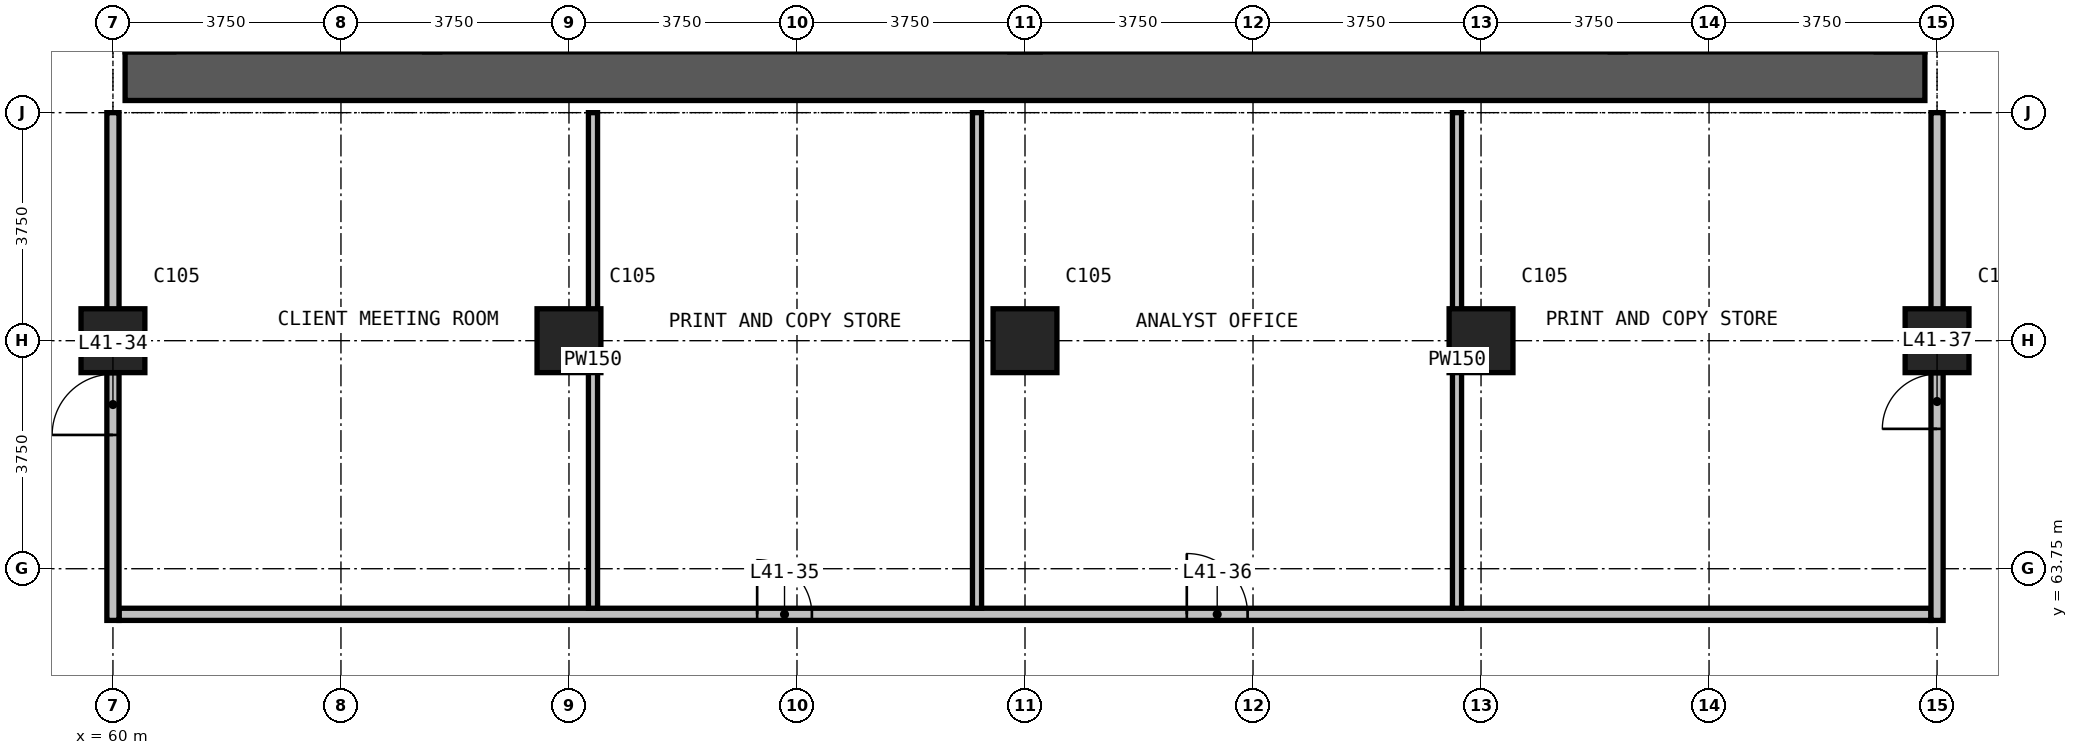
"""IFC4 building model, lengths in metres.
Left out: names, types, materials, properties, quantities, classifications, styles, units other than length and angle.
Written with IfcOpenShell. Run it as: python <this file> out.ifc"""

import sys

from ifc_helpers import new_model, si_unit, direction, frame, frame_2d, origin, origin_2d, place, context, subcontext, project, spatial, rectangle, extrude, element, fill, save


model = new_model("IFC4")
c1 = context("Model", 3, precision=1e-05, world=origin(), true_north=direction((0.0, 1.0)))
c2 = subcontext(c1, "Body", "Model", "MODEL_VIEW")
j1 = project(units=[si_unit("LENGTHUNIT", "METRE"), si_unit("PLANEANGLEUNIT", "RADIAN")], contexts=[c1])
p1 = place(None, origin())
s1 = spatial("IfcSite", under=j1, at=p1, CompositionType="ELEMENT")
p2 = place(p1, origin())
s2 = spatial("IfcBuilding", under=s1, at=p2, CompositionType="ELEMENT")
p3 = place(p2, frame((0.0, 0.0, 162.1)))
s3 = spatial("IfcBuildingStorey", under=s2, at=p3, CompositionType="ELEMENT", Elevation=162.1)
for number, where, z_axis, x_axis in (
    (1, (60.0, 67.5, 0.0), (0.0, 0.0, 1.0), (1.0, 0.0, 0.0)),
    (2, (67.5, 67.5, 0.0), (0.0, 0.0, 1.0), (1.0, 0.0, 0.0)),
    (3, (75.0, 67.5, 0.0), (0.0, 0.0, 1.0), (1.0, 0.0, 0.0)),
    (4, (82.5, 67.5, 0.0), (0.0, 0.0, 1.0), (1.0, 0.0, 0.0)),
    (5, (90.0, 67.5, 0.0), (0.0, 0.0, 1.0), (1.0, 0.0, 0.0)),
):
    element("IfcColumn", number, at=place(p3, frame(where, z_axis=z_axis, x_axis=x_axis)), inside=s3, PredefinedType="COLUMN", context=c2, shape_type="SweptSolid", body=[
        extrude(rectangle(XDim=1.05, YDim=1.05, at=origin_2d()), origin(), (0.0, 0.0, 1.0), 3.6),
    ])
p4 = place(p3, frame((60.2, 71.85, 0.0), z_axis=(0.0, 0.0, 1.0), x_axis=(1.0, 0.0, 0.0)))
e6 = element("IfcWall", 6, at=p4, inside=s3, PredefinedType="SHEAR", context=c2, shape_type="SweptSolid", body=[
    extrude(rectangle(XDim=29.6, YDim=0.8, at=frame_2d((14.8, 0.0))), origin(), (0.0, 0.0, 1.0), 3.6),
])
p5 = place(p3, frame((60.1, 63.0, 0.0), z_axis=(0.0, 0.0, 1.0), x_axis=(1.0, 0.0, 0.0)))
e7 = element("IfcWall", 7, at=p5, inside=s3, PredefinedType="PARTITIONING", context=c2, shape_type="SweptSolid", body=[
    extrude(rectangle(XDim=29.8, YDim=0.2, at=frame_2d((14.9, 0.0))), origin(), (0.0, 0.0, 1.0), 3.3),
])
p6 = place(p5, frame((10.495, 0.0, 0.0)))
e8 = element("IfcOpeningElement", 8, at=p6, cuts=e7, PredefinedType="OPENING", context=c2, shape_type="SweptSolid", body=[
    extrude(rectangle(XDim=0.9, YDim=2.2, at=frame_2d((0.45, 1.1))), frame((0.0, 0.11, 0.0), z_axis=(0.0, -1.0, 0.0), x_axis=(1.0, 0.0, 0.0)), (0.0, 0.0, 1.0), 0.22),
])
p7 = place(p5, frame((17.561, 0.0, 0.0)))
e9 = element("IfcOpeningElement", 9, at=p7, cuts=e7, PredefinedType="OPENING", context=c2, shape_type="SweptSolid", body=[
    extrude(rectangle(XDim=1.0, YDim=2.2, at=frame_2d((0.5, 1.1))), frame((0.0, 0.11, 0.0), z_axis=(0.0, -1.0, 0.0), x_axis=(1.0, 0.0, 0.0)), (0.0, 0.0, 1.0), 0.22),
])
p8 = place(p3, frame((60.0, 62.9, 0.0), z_axis=(0.0, 0.0, 1.0), x_axis=(0.0, 1.0, 0.0)))
e10 = element("IfcWall", 10, at=p8, inside=s3, PredefinedType="PARTITIONING", context=c2, shape_type="SweptSolid", body=[
    extrude(rectangle(XDim=8.35, YDim=0.2, at=frame_2d((4.175, 0.0))), origin(), (0.0, 0.0, 1.0), 3.3),
])
p9 = place(p8, frame((3.05, 0.0, 0.0)))
e11 = element("IfcOpeningElement", 11, at=p9, cuts=e10, PredefinedType="OPENING", context=c2, shape_type="SweptSolid", body=[
    extrude(rectangle(XDim=1.0, YDim=2.2, at=frame_2d((0.5, 1.1))), frame((0.0, 0.11, 0.0), z_axis=(0.0, -1.0, 0.0), x_axis=(1.0, 0.0, 0.0)), (0.0, 0.0, 1.0), 0.22),
])
p10 = place(p3, frame((90.0, 62.9, 0.0), z_axis=(0.0, 0.0, 1.0), x_axis=(0.0, 1.0, 0.0)))
e12 = element("IfcWall", 12, at=p10, inside=s3, PredefinedType="PARTITIONING", context=c2, shape_type="SweptSolid", body=[
    extrude(rectangle(XDim=8.35, YDim=0.2, at=frame_2d((4.175, 0.0))), origin(), (0.0, 0.0, 1.0), 3.3),
])
p11 = place(p10, frame((3.15, 0.0, 0.0)))
e13 = element("IfcOpeningElement", 13, at=p11, cuts=e12, PredefinedType="OPENING", context=c2, shape_type="SweptSolid", body=[
    extrude(rectangle(XDim=0.9, YDim=2.2, at=frame_2d((0.45, 1.1))), frame((0.0, 0.11, 0.0), z_axis=(0.0, -1.0, 0.0), x_axis=(1.0, 0.0, 0.0)), (0.0, 0.0, 1.0), 0.22),
])
for number, where, z_axis, x_axis in (
    (14, (67.895, 63.1, 0.0), (0.0, 0.0, 1.0), (0.0, 1.0, 0.0)),
    (15, (74.211, 63.1, 0.0), (0.0, 0.0, 1.0), (0.0, 1.0, 0.0)),
    (16, (82.105, 63.1, 0.0), (0.0, 0.0, 1.0), (0.0, 1.0, 0.0)),
):
    element("IfcWall", number, at=place(p3, frame(where, z_axis=z_axis, x_axis=x_axis)), inside=s3, PredefinedType="PARTITIONING", context=c2, shape_type="SweptSolid", body=[
        extrude(rectangle(XDim=8.15, YDim=0.15, at=frame_2d((4.075, 0.0))), origin(), (0.0, 0.0, 1.0), 3.3),
    ])
p12 = place(p9, origin())
e17 = element("IfcDoor", 17, at=p12, inside=s3, OperationType="SINGLE_SWING_RIGHT", PredefinedType="DOOR", context=c2, shape_type="SweptSolid", body=[
    extrude(rectangle(XDim=1.0, YDim=2.2, at=frame_2d((0.5, 1.1))), frame((0.0, 0.025, 0.0), z_axis=(0.0, -1.0, 0.0), x_axis=(1.0, 0.0, 0.0)), (0.0, 0.0, 1.0), 0.05),
])
fill(e11, e17)
p13 = place(p6, origin())
e18 = element("IfcDoor", 18, at=p13, inside=s3, OperationType="SINGLE_SWING_RIGHT", PredefinedType="DOOR", context=c2, shape_type="SweptSolid", body=[
    extrude(rectangle(XDim=0.9, YDim=2.2, at=frame_2d((0.45, 1.1))), frame((0.0, 0.025, 0.0), z_axis=(0.0, -1.0, 0.0), x_axis=(1.0, 0.0, 0.0)), (0.0, 0.0, 1.0), 0.05),
])
fill(e8, e18)
p14 = place(p7, origin())
e19 = element("IfcDoor", 19, at=p14, inside=s3, OperationType="SINGLE_SWING_LEFT", PredefinedType="DOOR", context=c2, shape_type="SweptSolid", body=[
    extrude(rectangle(XDim=1.0, YDim=2.2, at=frame_2d((0.5, 1.1))), frame((0.0, 0.025, 0.0), z_axis=(0.0, -1.0, 0.0), x_axis=(1.0, 0.0, 0.0)), (0.0, 0.0, 1.0), 0.05),
])
fill(e9, e19)
p15 = place(p11, origin())
e20 = element("IfcDoor", 20, at=p15, inside=s3, OperationType="SINGLE_SWING_LEFT", PredefinedType="DOOR", context=c2, shape_type="SweptSolid", body=[
    extrude(rectangle(XDim=0.9, YDim=2.2, at=frame_2d((0.45, 1.1))), frame((0.0, 0.025, 0.0), z_axis=(0.0, -1.0, 0.0), x_axis=(1.0, 0.0, 0.0)), (0.0, 0.0, 1.0), 0.05),
])
fill(e13, e20)
save(model, sys.argv[1])
